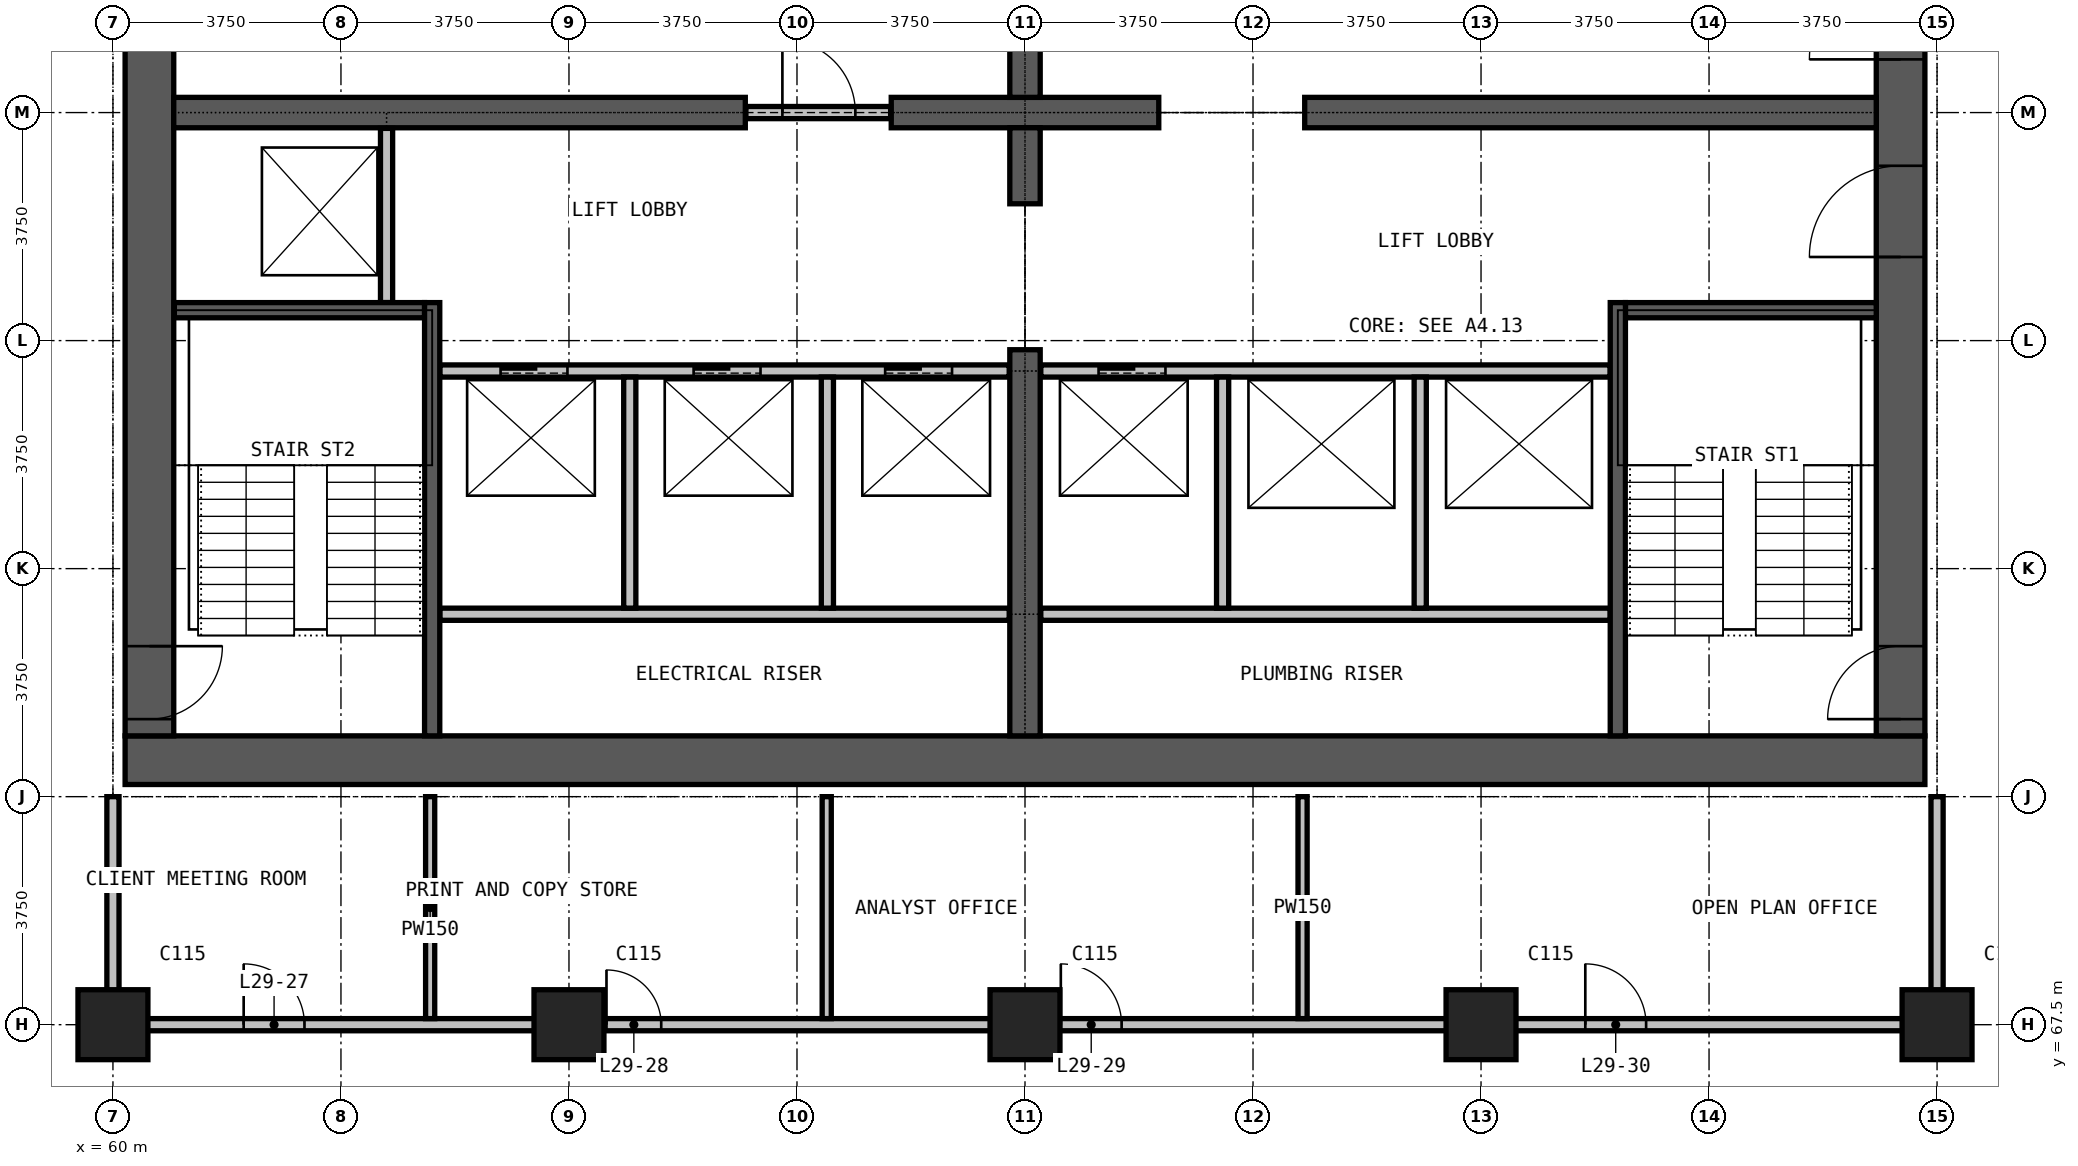
"""IFC4 building model, lengths in metres.
Left out: names, types, materials, properties, quantities, classifications, styles, units other than length and angle.
Written with IfcOpenShell. Run it as: python <this file> out.ifc"""

import sys

from ifc_helpers import new_model, si_unit, direction, frame, frame_2d, origin, origin_2d, place, context, subcontext, project, spatial, rectangle, extrude, element, fill, save


model = new_model("IFC4")
c1 = context("Model", 3, precision=1e-05, world=origin(), true_north=direction((0.0, 1.0)))
c2 = subcontext(c1, "Body", "Model", "MODEL_VIEW")
j1 = project(units=[si_unit("LENGTHUNIT", "METRE"), si_unit("PLANEANGLEUNIT", "RADIAN")], contexts=[c1])
p1 = place(None, origin())
s1 = spatial("IfcSite", under=j1, at=p1, CompositionType="ELEMENT")
p2 = place(p1, origin())
s2 = spatial("IfcBuilding", under=s1, at=p2, CompositionType="ELEMENT")
p3 = place(p2, frame((0.0, 0.0, 118.0)))
s3 = spatial("IfcBuildingStorey", under=s2, at=p3, CompositionType="ELEMENT", Elevation=118.0)
for number, where, z_axis, x_axis in (
    (1, (60.0, 67.5, 0.0), (0.0, 0.0, 1.0), (1.0, 0.0, 0.0)),
    (2, (67.5, 67.5, 0.0), (0.0, 0.0, 1.0), (1.0, 0.0, 0.0)),
    (3, (75.0, 67.5, 0.0), (0.0, 0.0, 1.0), (1.0, 0.0, 0.0)),
    (4, (82.5, 67.5, 0.0), (0.0, 0.0, 1.0), (1.0, 0.0, 0.0)),
    (5, (90.0, 67.5, 0.0), (0.0, 0.0, 1.0), (1.0, 0.0, 0.0)),
):
    element("IfcColumn", number, at=place(p3, frame(where, z_axis=z_axis, x_axis=x_axis)), inside=s3, PredefinedType="COLUMN", context=c2, shape_type="SweptSolid", body=[
        extrude(rectangle(XDim=1.15, YDim=1.15, at=origin_2d()), origin(), (0.0, 0.0, 1.0), 3.6),
    ])
p4 = place(p3, frame((60.2, 71.85, 0.0), z_axis=(0.0, 0.0, 1.0), x_axis=(1.0, 0.0, 0.0)))
e6 = element("IfcWall", 6, at=p4, inside=s3, PredefinedType="SHEAR", context=c2, shape_type="SweptSolid", body=[
    extrude(rectangle(XDim=29.6, YDim=0.8, at=frame_2d((14.8, 0.0))), origin(), (0.0, 0.0, 1.0), 3.6),
])
p5 = place(p3, frame((89.4, 72.25, 0.0), z_axis=(0.0, 0.0, 1.0), x_axis=(0.0, 1.0, 0.0)))
e7 = element("IfcWall", 7, at=p5, inside=s3, PredefinedType="SHEAR", context=c2, shape_type="SweptSolid", body=[
    extrude(rectangle(XDim=20.5, YDim=0.8, at=frame_2d((10.25, 0.0))), origin(), (0.0, 0.0, 1.0), 3.6),
])
p6 = place(p5, frame((0.275, 0.0, 0.0)))
e8 = element("IfcOpeningElement", 8, at=p6, cuts=e7, PredefinedType="OPENING", context=c2, shape_type="SweptSolid", body=[
    extrude(rectangle(XDim=1.2, YDim=2.2, at=frame_2d((0.6, 1.1))), frame((0.0, 0.41, 0.0), z_axis=(0.0, -1.0, 0.0), x_axis=(1.0, 0.0, 0.0)), (0.0, 0.0, 1.0), 0.82),
])
p7 = place(p5, frame((13.775, 0.0, 0.0)))
e9 = element("IfcOpeningElement", 9, at=p7, cuts=e7, PredefinedType="OPENING", context=c2, shape_type="SweptSolid", body=[
    extrude(rectangle(XDim=1.2, YDim=2.2, at=frame_2d((0.6, 1.1))), frame((0.0, 0.41, 0.0), z_axis=(0.0, -1.0, 0.0), x_axis=(1.0, 0.0, 0.0)), (0.0, 0.0, 1.0), 0.82),
])
p8 = place(p5, frame((7.875, 0.0, 0.0)))
e10 = element("IfcOpeningElement", 10, at=p8, cuts=e7, PredefinedType="OPENING", context=c2, shape_type="SweptSolid", body=[
    extrude(rectangle(XDim=1.5, YDim=2.2, at=frame_2d((0.75, 1.1))), frame((0.0, 0.41, 0.0), z_axis=(0.0, -1.0, 0.0), x_axis=(1.0, 0.0, 0.0)), (0.0, 0.0, 1.0), 0.82),
])
p9 = place(p5, frame((11.125, 0.0, 0.0)))
e11 = element("IfcOpeningElement", 11, at=p9, cuts=e7, PredefinedType="OPENING", context=c2, shape_type="SweptSolid", body=[
    extrude(rectangle(XDim=1.5, YDim=2.2, at=frame_2d((0.75, 1.1))), frame((0.0, 0.41, 0.0), z_axis=(0.0, -1.0, 0.0), x_axis=(1.0, 0.0, 0.0)), (0.0, 0.0, 1.0), 0.82),
])
p10 = place(p3, frame((60.6, 92.75, 0.0), z_axis=(0.0, 0.0, 1.0), x_axis=(0.0, -1.0, 0.0)))
e12 = element("IfcWall", 12, at=p10, inside=s3, PredefinedType="SHEAR", context=c2, shape_type="SweptSolid", body=[
    extrude(rectangle(XDim=20.5, YDim=0.8, at=frame_2d((10.25, 0.0))), origin(), (0.0, 0.0, 1.0), 3.6),
])
p11 = place(p10, frame((19.025, 0.0, 0.0)))
e13 = element("IfcOpeningElement", 13, at=p11, cuts=e12, PredefinedType="OPENING", context=c2, shape_type="SweptSolid", body=[
    extrude(rectangle(XDim=1.2, YDim=2.2, at=frame_2d((0.6, 1.1))), frame((0.0, 0.41, 0.0), z_axis=(0.0, -1.0, 0.0), x_axis=(1.0, 0.0, 0.0)), (0.0, 0.0, 1.0), 0.82),
])
p12 = place(p10, frame((8.025, 0.0, 0.0)))
e14 = element("IfcOpeningElement", 14, at=p12, cuts=e12, PredefinedType="OPENING", context=c2, shape_type="SweptSolid", body=[
    extrude(rectangle(XDim=1.2, YDim=2.2, at=frame_2d((0.6, 1.1))), frame((0.0, 0.41, 0.0), z_axis=(0.0, -1.0, 0.0), x_axis=(1.0, 0.0, 0.0)), (0.0, 0.0, 1.0), 0.82),
])
p13 = place(p3, frame((61.0, 82.5, 0.0), z_axis=(0.0, 0.0, 1.0), x_axis=(1.0, 0.0, 0.0)))
e15 = element("IfcWall", 15, at=p13, inside=s3, PredefinedType="SHEAR", context=c2, shape_type="SweptSolid", body=[
    extrude(rectangle(XDim=9.4, YDim=0.5, at=frame_2d((4.7, 0.0))), origin(), (0.0, 0.0, 1.0), 3.6),
])
p14 = place(p3, frame((72.8, 82.5, 0.0), z_axis=(0.0, 0.0, 1.0), x_axis=(1.0, 0.0, 0.0)))
e16 = element("IfcWall", 16, at=p14, inside=s3, PredefinedType="SHEAR", context=c2, shape_type="SweptSolid", body=[
    extrude(rectangle(XDim=4.4, YDim=0.5, at=frame_2d((2.2, 0.0))), origin(), (0.0, 0.0, 1.0), 3.6),
])
p15 = place(p3, frame((79.6, 82.5, 0.0), z_axis=(0.0, 0.0, 1.0), x_axis=(1.0, 0.0, 0.0)))
e17 = element("IfcWall", 17, at=p15, inside=s3, PredefinedType="SHEAR", context=c2, shape_type="SweptSolid", body=[
    extrude(rectangle(XDim=9.4, YDim=0.5, at=frame_2d((4.7, 0.0))), origin(), (0.0, 0.0, 1.0), 3.6),
])
p16 = place(p3, frame((75.0, 72.25, 0.0), z_axis=(0.0, 0.0, 1.0), x_axis=(0.0, 1.0, 0.0)))
e18 = element("IfcWall", 18, at=p16, inside=s3, PredefinedType="SHEAR", context=c2, shape_type="SweptSolid", body=[
    extrude(rectangle(XDim=6.35, YDim=0.5, at=frame_2d((3.175, 0.0))), origin(), (0.0, 0.0, 1.0), 3.6),
])
for number, where, z_axis, x_axis in (
    (19, (75.0, 81.0, 0.0), (0.0, 0.0, 1.0), (0.0, 1.0, 0.0)),
    (20, (75.0, 82.75, 0.0), (0.0, 0.0, 1.0), (0.0, 1.0, 0.0)),
):
    element("IfcWall", number, at=place(p3, frame(where, z_axis=z_axis, x_axis=x_axis)), inside=s3, PredefinedType="SHEAR", context=c2, shape_type="SweptSolid", body=[
        extrude(rectangle(XDim=1.25, YDim=0.5, at=frame_2d((0.625, 0.0))), origin(), (0.0, 0.0, 1.0), 3.6),
    ])
p17 = place(p3, frame((70.41, 82.5, 0.0), z_axis=(0.0, 0.0, 1.0), x_axis=(1.0, 0.0, 0.0)))
e21 = element("IfcWall", 21, at=p17, inside=s3, PredefinedType="PARTITIONING", context=c2, shape_type="SweptSolid", body=[
    extrude(rectangle(XDim=2.38, YDim=0.2, at=frame_2d((1.19, 0.0))), origin(), (0.0, 0.0, 1.0), 2.4),
])
p18 = place(p17, frame((0.6, 0.0, 0.0)))
e22 = element("IfcOpeningElement", 22, at=p18, cuts=e21, PredefinedType="OPENING", context=c2, shape_type="SweptSolid", body=[
    extrude(rectangle(XDim=1.2, YDim=2.2, at=frame_2d((0.6, 1.1))), frame((0.0, 0.11, 0.0), z_axis=(0.0, -1.0, 0.0), x_axis=(1.0, 0.0, 0.0)), (0.0, 0.0, 1.0), 0.22),
])
p19 = place(p3, frame((60.1, 67.5, 0.0), z_axis=(0.0, 0.0, 1.0), x_axis=(1.0, 0.0, 0.0)))
e23 = element("IfcWall", 23, at=p19, inside=s3, PredefinedType="PARTITIONING", context=c2, shape_type="SweptSolid", body=[
    extrude(rectangle(XDim=29.8, YDim=0.2, at=frame_2d((14.9, 0.0))), origin(), (0.0, 0.0, 1.0), 3.3),
])
p20 = place(p19, frame((2.05, 0.0, 0.0)))
e24 = element("IfcOpeningElement", 24, at=p20, cuts=e23, PredefinedType="OPENING", context=c2, shape_type="SweptSolid", body=[
    extrude(rectangle(XDim=1.0, YDim=2.2, at=frame_2d((0.5, 1.1))), frame((0.0, 0.11, 0.0), z_axis=(0.0, -1.0, 0.0), x_axis=(1.0, 0.0, 0.0)), (0.0, 0.0, 1.0), 0.22),
])
p21 = place(p19, frame((8.017, 0.0, 0.0)))
e25 = element("IfcOpeningElement", 25, at=p21, cuts=e23, PredefinedType="OPENING", context=c2, shape_type="SweptSolid", body=[
    extrude(rectangle(XDim=0.9, YDim=2.2, at=frame_2d((0.45, 1.1))), frame((0.0, 0.11, 0.0), z_axis=(0.0, -1.0, 0.0), x_axis=(1.0, 0.0, 0.0)), (0.0, 0.0, 1.0), 0.22),
])
p22 = place(p19, frame((15.489, 0.0, 0.0)))
e26 = element("IfcOpeningElement", 26, at=p22, cuts=e23, PredefinedType="OPENING", context=c2, shape_type="SweptSolid", body=[
    extrude(rectangle(XDim=1.0, YDim=2.2, at=frame_2d((0.5, 1.1))), frame((0.0, 0.11, 0.0), z_axis=(0.0, -1.0, 0.0), x_axis=(1.0, 0.0, 0.0)), (0.0, 0.0, 1.0), 0.22),
])
p23 = place(p19, frame((24.115, 0.0, 0.0)))
e27 = element("IfcOpeningElement", 27, at=p23, cuts=e23, PredefinedType="OPENING", context=c2, shape_type="SweptSolid", body=[
    extrude(rectangle(XDim=1.0, YDim=2.2, at=frame_2d((0.5, 1.1))), frame((0.0, 0.11, 0.0), z_axis=(0.0, -1.0, 0.0), x_axis=(1.0, 0.0, 0.0)), (0.0, 0.0, 1.0), 0.22),
])
for number, where, z_axis, x_axis in (
    (28, (60.0, 67.4, 0.0), (0.0, 0.0, 1.0), (0.0, 1.0, 0.0)),
    (29, (90.0, 67.4, 0.0), (0.0, 0.0, 1.0), (0.0, 1.0, 0.0)),
):
    element("IfcWall", number, at=place(p3, frame(where, z_axis=z_axis, x_axis=x_axis)), inside=s3, PredefinedType="PARTITIONING", context=c2, shape_type="SweptSolid", body=[
        extrude(rectangle(XDim=3.85, YDim=0.2, at=frame_2d((1.925, 0.0))), origin(), (0.0, 0.0, 1.0), 3.3),
    ])
for number, where, z_axis, x_axis in (
    (30, (65.217, 67.6, 0.0), (0.0, 0.0, 1.0), (0.0, 1.0, 0.0)),
    (31, (71.739, 67.6, 0.0), (0.0, 0.0, 1.0), (0.0, 1.0, 0.0)),
    (32, (79.565, 67.6, 0.0), (0.0, 0.0, 1.0), (0.0, 1.0, 0.0)),
):
    element("IfcWall", number, at=place(p3, frame(where, z_axis=z_axis, x_axis=x_axis)), inside=s3, PredefinedType="PARTITIONING", context=c2, shape_type="SweptSolid", body=[
        extrude(rectangle(XDim=3.65, YDim=0.15, at=frame_2d((1.825, 0.0))), origin(), (0.0, 0.0, 1.0), 3.3),
    ])
for number, where, z_axis, x_axis in (
    (33, (65.375, 74.25, 0.0), (0.0, 0.0, 1.0), (1.0, 0.0, 0.0)),
    (34, (75.26, 74.25, 0.0), (0.0, 0.0, 1.0), (1.0, 0.0, 0.0)),
):
    element("IfcWall", number, at=place(p3, frame(where, z_axis=z_axis, x_axis=x_axis)), inside=s3, PredefinedType="PARTITIONING", context=c2, shape_type="SweptSolid", body=[
        extrude(rectangle(XDim=9.365, YDim=0.2, at=frame_2d((4.683, 0.0))), origin(), (0.0, 0.0, 1.0), 3.3),
    ])
p24 = place(p3, frame((65.375, 78.25, 0.0), z_axis=(0.0, 0.0, 1.0), x_axis=(1.0, 0.0, 0.0)))
e35 = element("IfcWall", 35, at=p24, inside=s3, PredefinedType="PARTITIONING", context=c2, shape_type="SweptSolid", body=[
    extrude(rectangle(XDim=9.365, YDim=0.2, at=frame_2d((4.683, 0.0))), origin(), (0.0, 0.0, 1.0), 3.3),
])
p25 = place(p24, frame((1.0, 0.0, 0.0)))
e36 = element("IfcOpeningElement", 36, at=p25, cuts=e35, PredefinedType="OPENING", context=c2, shape_type="SweptSolid", body=[
    extrude(rectangle(XDim=1.1, YDim=2.2, at=frame_2d((0.55, 1.1))), frame((0.0, 0.11, 0.0), z_axis=(0.0, -1.0, 0.0), x_axis=(1.0, 0.0, 0.0)), (0.0, 0.0, 1.0), 0.22),
])
p26 = place(p24, frame((4.175, 0.0, 0.0)))
e37 = element("IfcOpeningElement", 37, at=p26, cuts=e35, PredefinedType="OPENING", context=c2, shape_type="SweptSolid", body=[
    extrude(rectangle(XDim=1.1, YDim=2.2, at=frame_2d((0.55, 1.1))), frame((0.0, 0.11, 0.0), z_axis=(0.0, -1.0, 0.0), x_axis=(1.0, 0.0, 0.0)), (0.0, 0.0, 1.0), 0.22),
])
p27 = place(p24, frame((7.325, 0.0, 0.0)))
e38 = element("IfcOpeningElement", 38, at=p27, cuts=e35, PredefinedType="OPENING", context=c2, shape_type="SweptSolid", body=[
    extrude(rectangle(XDim=1.1, YDim=2.2, at=frame_2d((0.55, 1.1))), frame((0.0, 0.11, 0.0), z_axis=(0.0, -1.0, 0.0), x_axis=(1.0, 0.0, 0.0)), (0.0, 0.0, 1.0), 0.22),
])
p28 = place(p3, frame((75.26, 78.25, 0.0), z_axis=(0.0, 0.0, 1.0), x_axis=(1.0, 0.0, 0.0)))
e39 = element("IfcWall", 39, at=p28, inside=s3, PredefinedType="PARTITIONING", context=c2, shape_type="SweptSolid", body=[
    extrude(rectangle(XDim=9.365, YDim=0.2, at=frame_2d((4.683, 0.0))), origin(), (0.0, 0.0, 1.0), 3.3),
])
p29 = place(p28, frame((0.95, 0.0, 0.0)))
e40 = element("IfcOpeningElement", 40, at=p29, cuts=e39, PredefinedType="OPENING", context=c2, shape_type="SweptSolid", body=[
    extrude(rectangle(XDim=1.1, YDim=2.2, at=frame_2d((0.55, 1.1))), frame((0.0, 0.11, 0.0), z_axis=(0.0, -1.0, 0.0), x_axis=(1.0, 0.0, 0.0)), (0.0, 0.0, 1.0), 0.22),
])
p30 = place(p3, frame((64.5, 79.375, 0.0), z_axis=(0.0, 0.0, 1.0), x_axis=(0.0, 1.0, 0.0)))
e41 = element("IfcWall", 41, at=p30, inside=s3, PredefinedType="PARTITIONING", context=c2, shape_type="SweptSolid", body=[
    extrude(rectangle(XDim=2.865, YDim=0.2, at=frame_2d((1.433, 0.0))), origin(), (0.0, 0.0, 1.0), 3.3),
])
for number, where, z_axis, x_axis in (
    (42, (68.5, 74.35, 0.0), (0.0, 0.0, 1.0), (0.0, 1.0, 0.0)),
    (43, (71.75, 74.35, 0.0), (0.0, 0.0, 1.0), (0.0, 1.0, 0.0)),
    (44, (78.25, 74.35, 0.0), (0.0, 0.0, 1.0), (0.0, 1.0, 0.0)),
    (45, (81.5, 74.35, 0.0), (0.0, 0.0, 1.0), (0.0, 1.0, 0.0)),
):
    element("IfcWall", number, at=place(p3, frame(where, z_axis=z_axis, x_axis=x_axis)), inside=s3, PredefinedType="PARTITIONING", context=c2, shape_type="SweptSolid", body=[
        extrude(rectangle(XDim=3.8, YDim=0.2, at=frame_2d((1.9, 0.0))), origin(), (0.0, 0.0, 1.0), 3.3),
    ])
p31 = place(p3, frame((61.01, 79.25, 0.0), z_axis=(0.0, 0.0, 1.0), x_axis=(1.0, 0.0, 0.0)))
e46 = element("IfcWall", 46, at=p31, inside=s3, PredefinedType="PARTITIONING", context=c2, shape_type="SweptSolid", body=[
    extrude(rectangle(XDim=4.115, YDim=0.25, at=frame_2d((2.058, 0.0))), origin(), (0.0, 0.0, 1.0), 3.3),
])
p32 = place(p3, frame((84.875, 79.25, 0.0), z_axis=(0.0, 0.0, 1.0), x_axis=(1.0, 0.0, 0.0)))
e47 = element("IfcWall", 47, at=p32, inside=s3, PredefinedType="PARTITIONING", context=c2, shape_type="SweptSolid", body=[
    extrude(rectangle(XDim=4.125, YDim=0.25, at=frame_2d((2.062, 0.0))), origin(), (0.0, 0.0, 1.0), 3.3),
])
for number, where, z_axis, x_axis in (
    (48, (65.25, 72.25, 0.0), (0.0, 0.0, 1.0), (0.0, 1.0, 0.0)),
    (49, (84.75, 72.25, 0.0), (0.0, 0.0, 1.0), (0.0, 1.0, 0.0)),
):
    element("IfcWall", number, at=place(p3, frame(where, z_axis=z_axis, x_axis=x_axis)), inside=s3, PredefinedType="PARTITIONING", context=c2, shape_type="SweptSolid", body=[
        extrude(rectangle(XDim=7.125, YDim=0.25, at=frame_2d((3.562, 0.0))), origin(), (0.0, 0.0, 1.0), 3.3),
    ])
p33 = place(p25, origin())
e50 = element("IfcDoor", 50, at=p33, inside=s3, OperationType="DOUBLE_DOOR_SLIDING", PredefinedType="DOOR", context=c2, shape_type="SweptSolid", body=[
    extrude(rectangle(XDim=1.1, YDim=2.2, at=frame_2d((0.55, 1.1))), frame((0.0, 0.025, 0.0), z_axis=(0.0, -1.0, 0.0), x_axis=(1.0, 0.0, 0.0)), (0.0, 0.0, 1.0), 0.05),
])
fill(e36, e50)
p34 = place(p26, origin())
e51 = element("IfcDoor", 51, at=p34, inside=s3, OperationType="DOUBLE_DOOR_SLIDING", PredefinedType="DOOR", context=c2, shape_type="SweptSolid", body=[
    extrude(rectangle(XDim=1.1, YDim=2.2, at=frame_2d((0.55, 1.1))), frame((0.0, 0.025, 0.0), z_axis=(0.0, -1.0, 0.0), x_axis=(1.0, 0.0, 0.0)), (0.0, 0.0, 1.0), 0.05),
])
fill(e37, e51)
p35 = place(p27, origin())
e52 = element("IfcDoor", 52, at=p35, inside=s3, OperationType="DOUBLE_DOOR_SLIDING", PredefinedType="DOOR", context=c2, shape_type="SweptSolid", body=[
    extrude(rectangle(XDim=1.1, YDim=2.2, at=frame_2d((0.55, 1.1))), frame((0.0, 0.025, 0.0), z_axis=(0.0, -1.0, 0.0), x_axis=(1.0, 0.0, 0.0)), (0.0, 0.0, 1.0), 0.05),
])
fill(e38, e52)
p36 = place(p29, origin())
e53 = element("IfcDoor", 53, at=p36, inside=s3, OperationType="DOUBLE_DOOR_SLIDING", PredefinedType="DOOR", context=c2, shape_type="SweptSolid", body=[
    extrude(rectangle(XDim=1.1, YDim=2.2, at=frame_2d((0.55, 1.1))), frame((0.0, 0.025, 0.0), z_axis=(0.0, -1.0, 0.0), x_axis=(1.0, 0.0, 0.0)), (0.0, 0.0, 1.0), 0.05),
])
fill(e40, e53)
p37 = place(p18, origin())
e54 = element("IfcDoor", 54, at=p37, inside=s3, OperationType="SINGLE_SWING_RIGHT", PredefinedType="DOOR", context=c2, shape_type="SweptSolid", body=[
    extrude(rectangle(XDim=1.2, YDim=2.2, at=frame_2d((0.6, 1.1))), frame((0.0, 0.025, 0.0), z_axis=(0.0, -1.0, 0.0), x_axis=(1.0, 0.0, 0.0)), (0.0, 0.0, 1.0), 0.05),
])
fill(e22, e54)
p38 = place(p6, origin())
e55 = element("IfcDoor", 55, at=p38, inside=s3, OperationType="SINGLE_SWING_LEFT", PredefinedType="DOOR", context=c2, shape_type="SweptSolid", body=[
    extrude(rectangle(XDim=1.2, YDim=2.2, at=frame_2d((0.6, 1.1))), frame((0.0, 0.025, 0.0), z_axis=(0.0, -1.0, 0.0), x_axis=(1.0, 0.0, 0.0)), (0.0, 0.0, 1.0), 0.05),
])
fill(e8, e55)
p39 = place(p11, origin())
e56 = element("IfcDoor", 56, at=p39, inside=s3, OperationType="SINGLE_SWING_LEFT", PredefinedType="DOOR", context=c2, shape_type="SweptSolid", body=[
    extrude(rectangle(XDim=1.2, YDim=2.2, at=frame_2d((0.6, 1.1))), frame((0.0, 0.025, 0.0), z_axis=(0.0, -1.0, 0.0), x_axis=(1.0, 0.0, 0.0)), (0.0, 0.0, 1.0), 0.05),
])
fill(e13, e56)
p40 = place(p8, origin())
e57 = element("IfcDoor", 57, at=p40, inside=s3, OperationType="DOUBLE_DOOR_SINGLE_SWING", PredefinedType="DOOR", context=c2, shape_type="SweptSolid", body=[
    extrude(rectangle(XDim=1.5, YDim=2.2, at=frame_2d((0.75, 1.1))), frame((0.0, 0.025, 0.0), z_axis=(0.0, -1.0, 0.0), x_axis=(1.0, 0.0, 0.0)), (0.0, 0.0, 1.0), 0.05),
])
fill(e10, e57)
p41 = place(p9, origin())
e58 = element("IfcDoor", 58, at=p41, inside=s3, OperationType="DOUBLE_DOOR_SINGLE_SWING", PredefinedType="DOOR", context=c2, shape_type="SweptSolid", body=[
    extrude(rectangle(XDim=1.5, YDim=2.2, at=frame_2d((0.75, 1.1))), frame((0.0, 0.025, 0.0), z_axis=(0.0, -1.0, 0.0), x_axis=(1.0, 0.0, 0.0)), (0.0, 0.0, 1.0), 0.05),
])
fill(e11, e58)
p42 = place(p20, origin())
e59 = element("IfcDoor", 59, at=p42, inside=s3, OperationType="SINGLE_SWING_LEFT", PredefinedType="DOOR", context=c2, shape_type="SweptSolid", body=[
    extrude(rectangle(XDim=1.0, YDim=2.2, at=frame_2d((0.5, 1.1))), frame((0.0, 0.025, 0.0), z_axis=(0.0, -1.0, 0.0), x_axis=(1.0, 0.0, 0.0)), (0.0, 0.0, 1.0), 0.05),
])
fill(e24, e59)
p43 = place(p21, origin())
e60 = element("IfcDoor", 60, at=p43, inside=s3, OperationType="SINGLE_SWING_LEFT", PredefinedType="DOOR", context=c2, shape_type="SweptSolid", body=[
    extrude(rectangle(XDim=0.9, YDim=2.2, at=frame_2d((0.45, 1.1))), frame((0.0, 0.025, 0.0), z_axis=(0.0, -1.0, 0.0), x_axis=(1.0, 0.0, 0.0)), (0.0, 0.0, 1.0), 0.05),
])
fill(e25, e60)
p44 = place(p22, origin())
e61 = element("IfcDoor", 61, at=p44, inside=s3, OperationType="SINGLE_SWING_RIGHT", PredefinedType="DOOR", context=c2, shape_type="SweptSolid", body=[
    extrude(rectangle(XDim=1.0, YDim=2.2, at=frame_2d((0.5, 1.1))), frame((0.0, 0.025, 0.0), z_axis=(0.0, -1.0, 0.0), x_axis=(1.0, 0.0, 0.0)), (0.0, 0.0, 1.0), 0.05),
])
fill(e26, e61)
p45 = place(p23, origin())
e62 = element("IfcDoor", 62, at=p45, inside=s3, OperationType="SINGLE_SWING_LEFT", PredefinedType="DOOR", context=c2, shape_type="SweptSolid", body=[
    extrude(rectangle(XDim=1.0, YDim=2.2, at=frame_2d((0.5, 1.1))), frame((0.0, 0.025, 0.0), z_axis=(0.0, -1.0, 0.0), x_axis=(1.0, 0.0, 0.0)), (0.0, 0.0, 1.0), 0.05),
])
fill(e27, e62)
save(model, sys.argv[1])
